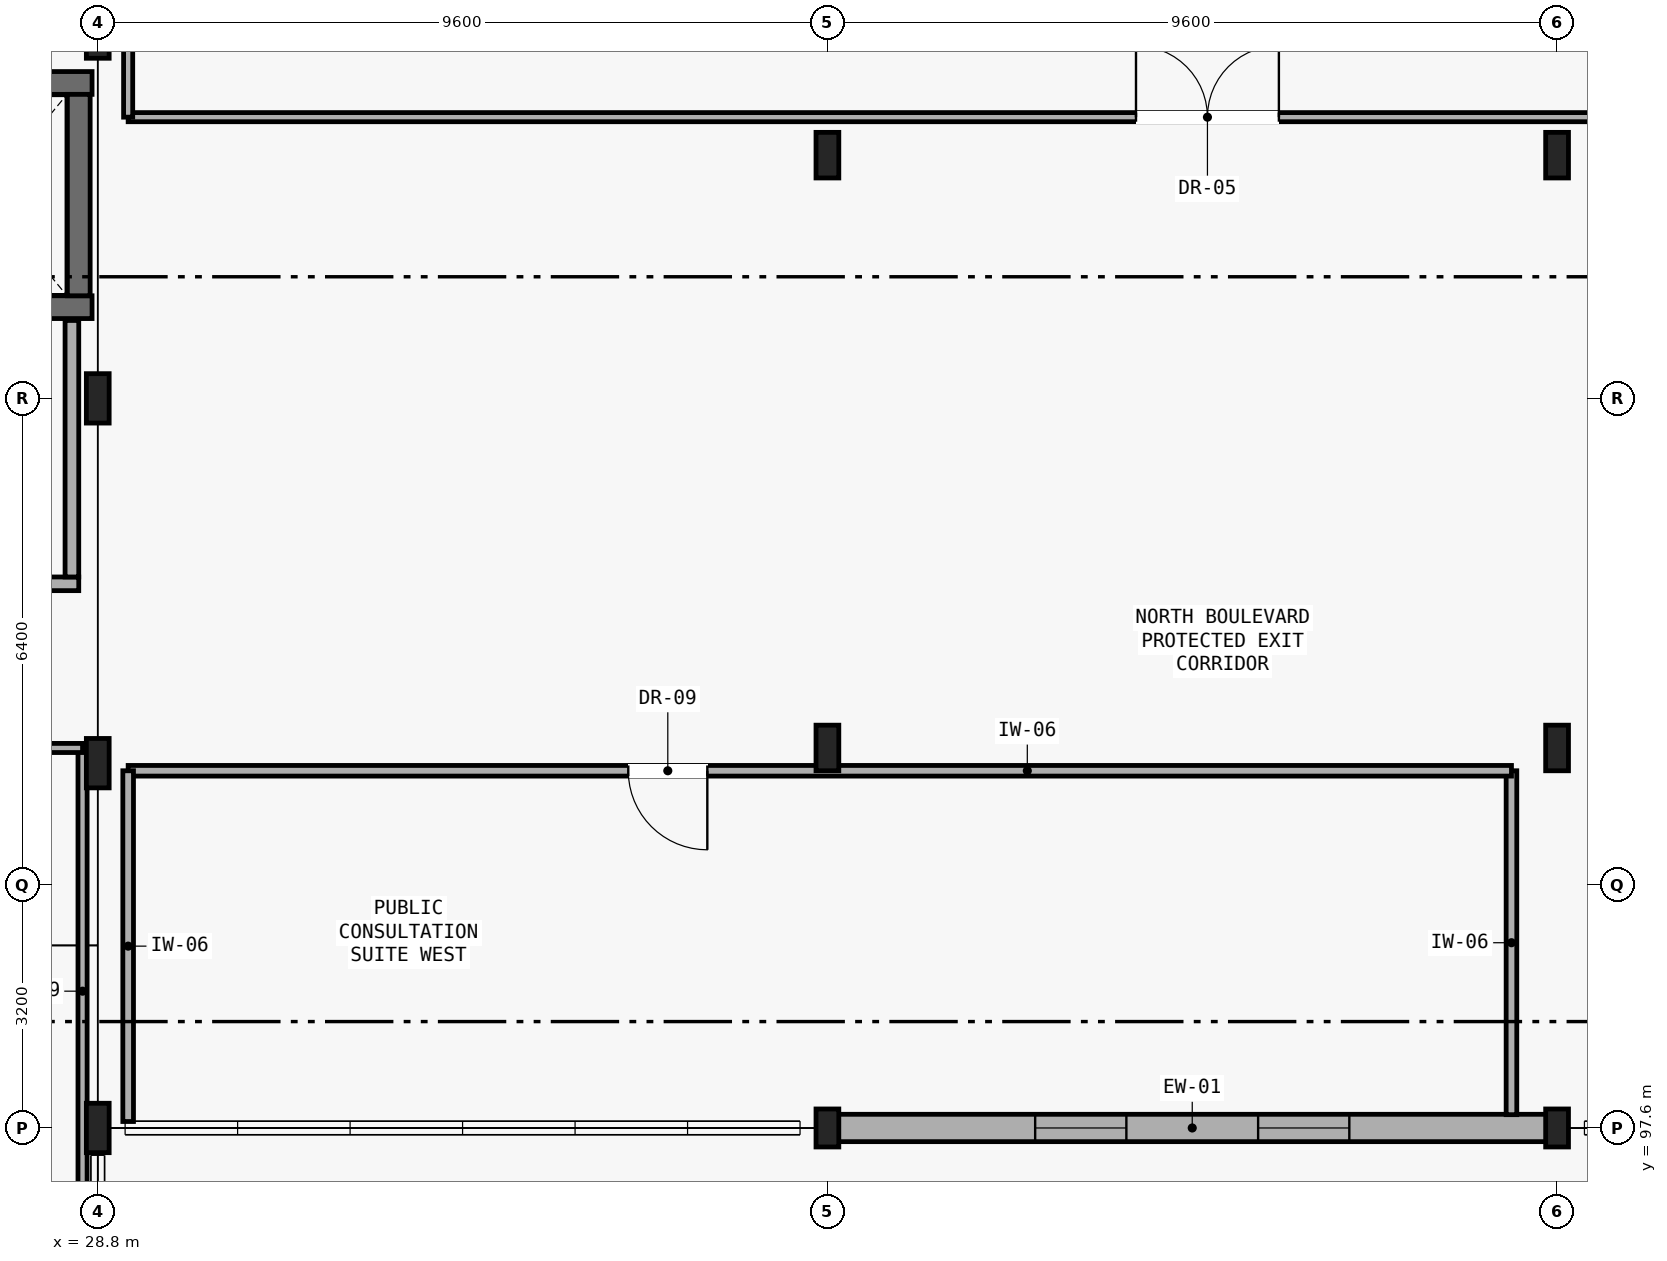
"""IFC4 building model, lengths in metres.
Left out: names, types, materials, properties, quantities, classifications, styles, units other than length and angle.
Written with IfcOpenShell. Run it as: python <this file> out.ifc"""

import sys

from ifc_helpers import new_model, si_unit, direction, frame, frame_2d, origin, origin_2d, place, context, subcontext, project, spatial, rectangle, i_section, extrude, element, fill, save


model = new_model("IFC4")
c1 = context("Model", 3, precision=1e-05, world=origin(), true_north=direction((0.0, 1.0)))
c2 = subcontext(c1, "Body", "Model", "MODEL_VIEW")
j1 = project(units=[si_unit("LENGTHUNIT", "METRE"), si_unit("PLANEANGLEUNIT", "RADIAN")], contexts=[c1])
p1 = place(None, origin())
s1 = spatial("IfcSite", under=j1, at=p1, CompositionType="ELEMENT")
p2 = place(p1, origin())
s2 = spatial("IfcBuilding", under=s1, at=p2, CompositionType="ELEMENT")
p3 = place(p2, origin())
s3 = spatial("IfcBuildingStorey", under=s2, at=p3, CompositionType="ELEMENT", Elevation=0.0)
for number, where, z_axis, x_axis in (
    (1, (28.8, 97.6, 0.0), (0.0, 0.0, 1.0), (1.0, 0.0, 0.0)),
    (2, (28.8, 102.4, 0.0), (0.0, 0.0, 1.0), (1.0, 0.0, 0.0)),
    (3, (28.8, 107.2, 0.0), (0.0, 0.0, 1.0), (1.0, 0.0, 0.0)),
    (4, (28.8, 112.0, 0.0), (0.0, 0.0, 1.0), (1.0, 0.0, 0.0)),
):
    element("IfcColumn", number, at=place(p3, frame(where, z_axis=z_axis, x_axis=x_axis)), inside=s3, PredefinedType="COLUMN", context=c2, shape_type="SweptSolid", body=[
        extrude(i_section(OverallWidth=0.3, OverallDepth=0.65, WebThickness=0.016, FlangeThickness=0.031, FilletRadius=0.027, at=origin_2d()), origin(), (0.0, 0.0, 1.0), 5.25),
    ])
p4 = place(p3, frame((38.4, 97.6, 0.0), z_axis=(0.0, 0.0, 1.0), x_axis=(1.0, 0.0, 0.0)))
e5 = element("IfcColumn", 5, at=p4, inside=s3, PredefinedType="COLUMN", context=c2, shape_type="SweptSolid", body=[
    extrude(i_section(OverallWidth=0.3, OverallDepth=0.5, WebThickness=0.014, FlangeThickness=0.028, FilletRadius=0.027, at=origin_2d()), origin(), (0.0, 0.0, 1.0), 5.25),
])
for number, where, z_axis, x_axis in (
    (6, (38.4, 102.6, 0.0), (0.0, 0.0, 1.0), (1.0, 0.0, 0.0)),
    (7, (38.4, 110.4, 0.0), (0.0, 0.0, 1.0), (1.0, 0.0, 0.0)),
):
    element("IfcColumn", number, at=place(p3, frame(where, z_axis=z_axis, x_axis=x_axis)), inside=s3, PredefinedType="COLUMN", context=c2, shape_type="SweptSolid", body=[
        extrude(i_section(OverallWidth=0.3, OverallDepth=0.6, WebThickness=0.015, FlangeThickness=0.03, FilletRadius=0.027, at=origin_2d()), origin(), (0.0, 0.0, 1.0), 5.25),
    ])
p5 = place(p3, frame((48.0, 97.6, 0.0), z_axis=(0.0, 0.0, 1.0), x_axis=(1.0, 0.0, 0.0)))
e8 = element("IfcColumn", 8, at=p5, inside=s3, PredefinedType="COLUMN", context=c2, shape_type="SweptSolid", body=[
    extrude(i_section(OverallWidth=0.3, OverallDepth=0.5, WebThickness=0.014, FlangeThickness=0.028, FilletRadius=0.027, at=origin_2d()), origin(), (0.0, 0.0, 1.0), 5.25),
])
for number, where, z_axis, x_axis in (
    (9, (48.0, 102.6, 0.0), (0.0, 0.0, 1.0), (1.0, 0.0, 0.0)),
    (10, (48.0, 110.4, 0.0), (0.0, 0.0, 1.0), (1.0, 0.0, 0.0)),
):
    element("IfcColumn", number, at=place(p3, frame(where, z_axis=z_axis, x_axis=x_axis)), inside=s3, PredefinedType="COLUMN", context=c2, shape_type="SweptSolid", body=[
        extrude(i_section(OverallWidth=0.3, OverallDepth=0.6, WebThickness=0.015, FlangeThickness=0.03, FilletRadius=0.027, at=origin_2d()), origin(), (0.0, 0.0, 1.0), 5.25),
    ])
p6 = place(p3, frame((38.409, 97.6, 0.0), z_axis=(0.0, 0.0, 1.0), x_axis=(1.0, 0.0, 0.0)))
e11 = element("IfcWall", 11, at=p6, inside=s3, PredefinedType="SOLIDWALL", context=c2, shape_type="SweptSolid", body=[
    extrude(rectangle(XDim=9.582, YDim=0.36, at=frame_2d((4.791, 0.0))), origin(), (0.0, 0.0, 1.0), 4.67),
])
p7 = place(p6, frame((2.724, 0.0, 0.9)))
e12 = element("IfcOpeningElement", 12, at=p7, cuts=e11, PredefinedType="OPENING", context=c2, shape_type="SweptSolid", body=[
    extrude(rectangle(XDim=1.2, YDim=1.45, at=frame_2d((0.6, 0.725))), frame((0.0, 0.19, 0.0), z_axis=(0.0, -1.0, 0.0), x_axis=(1.0, 0.0, 0.0)), (0.0, 0.0, 1.0), 0.38),
])
p8 = place(p6, frame((5.657, 0.0, 0.9)))
e13 = element("IfcOpeningElement", 13, at=p8, cuts=e11, PredefinedType="OPENING", context=c2, shape_type="SweptSolid", body=[
    extrude(rectangle(XDim=1.2, YDim=1.45, at=frame_2d((0.6, 0.725))), frame((0.0, 0.19, 0.0), z_axis=(0.0, -1.0, 0.0), x_axis=(1.0, 0.0, 0.0)), (0.0, 0.0, 1.0), 0.38),
])
p9 = place(p3, frame((26.225, 108.4, 0.0), z_axis=(0.0, 0.0, 1.0), x_axis=(1.0, 0.0, 0.0)))
e14 = element("IfcWall", 14, at=p9, inside=s3, PredefinedType="SHEAR", context=c2, shape_type="SweptSolid", body=[
    extrude(rectangle(XDim=2.5, YDim=0.3, at=frame_2d((1.25, 0.0))), origin(), (0.0, 0.0, 1.0), 5.0),
])
p10 = place(p9, frame((0.7, 0.0, 0.0)))
e15 = element("IfcOpeningElement", 15, at=p10, cuts=e14, PredefinedType="OPENING", context=c2, shape_type="SweptSolid", body=[
    extrude(rectangle(XDim=1.1, YDim=2.1, at=frame_2d((0.55, 1.05))), frame((0.0, 0.16, 0.0), z_axis=(0.0, -1.0, 0.0), x_axis=(1.0, 0.0, 0.0)), (0.0, 0.0, 1.0), 0.32),
])
p11 = place(p3, frame((26.225, 111.35, 0.0), z_axis=(0.0, 0.0, 1.0), x_axis=(1.0, 0.0, 0.0)))
e16 = element("IfcWall", 16, at=p11, inside=s3, PredefinedType="SHEAR", context=c2, shape_type="SweptSolid", body=[
    extrude(rectangle(XDim=2.5, YDim=0.3, at=frame_2d((1.25, 0.0))), origin(), (0.0, 0.0, 1.0), 5.0),
])
p12 = place(p3, frame((28.55, 108.55, 0.0), z_axis=(0.0, 0.0, 1.0), x_axis=(0.0, 1.0, 0.0)))
e17 = element("IfcWall", 17, at=p12, inside=s3, PredefinedType="SHEAR", context=c2, shape_type="SweptSolid", body=[
    extrude(rectangle(XDim=2.65, YDim=0.3, at=frame_2d((1.325, 0.0))), origin(), (0.0, 0.0, 1.0), 5.0),
])
p13 = place(p3, frame((20.0, 104.76, 0.0), z_axis=(0.0, 0.0, 1.0), x_axis=(1.0, 0.0, 0.0)))
e18 = element("IfcWall", 18, at=p13, inside=s3, PredefinedType="PARTITIONING", context=c2, shape_type="SweptSolid", body=[
    extrude(rectangle(XDim=8.55, YDim=0.18, at=frame_2d((4.275, 0.0))), origin(), (0.0, 0.0, 1.0), 4.48),
])
p14 = place(p3, frame((28.46, 104.85, 0.0), z_axis=(0.0, 0.0, 1.0), x_axis=(0.0, 1.0, 0.0)))
e19 = element("IfcWall", 19, at=p14, inside=s3, PredefinedType="PARTITIONING", context=c2, shape_type="SweptSolid", body=[
    extrude(rectangle(XDim=3.375, YDim=0.18, at=frame_2d((1.688, 0.0))), origin(), (0.0, 0.0, 1.0), 5.0),
])
p15 = place(p3, frame((28.6, 96.2, 0.0), z_axis=(0.0, 0.0, 1.0), x_axis=(0.0, 1.0, 0.0)))
e20 = element("IfcWall", 20, at=p15, inside=s3, PredefinedType="PARTITIONING", context=c2, shape_type="SweptSolid", body=[
    extrude(rectangle(XDim=6.4, YDim=0.12, at=frame_2d((3.2, 0.0))), origin(), (0.0, 0.0, 1.0), 4.44),
])
p16 = place(p3, frame((28.6, 102.6, 0.0), z_axis=(0.0, 0.0, 1.0), x_axis=(-1.0, 0.0, 0.0)))
e21 = element("IfcWall", 21, at=p16, inside=s3, PredefinedType="PARTITIONING", context=c2, shape_type="SweptSolid", body=[
    extrude(rectangle(XDim=8.52, YDim=0.12, at=frame_2d((4.26, 0.0))), origin(), (0.0, 0.0, 1.0), 4.08),
])
p17 = place(p16, frame((3.77, 0.0, 0.0)))
e22 = element("IfcOpeningElement", 22, at=p17, cuts=e21, PredefinedType="OPENING", context=c2, shape_type="SweptSolid", body=[
    extrude(rectangle(XDim=0.98, YDim=2.1, at=frame_2d((0.49, 1.05))), frame((0.0, 0.07, 0.0), z_axis=(0.0, -1.0, 0.0), x_axis=(1.0, 0.0, 0.0)), (0.0, 0.0, 1.0), 0.14),
])
p18 = place(p3, frame((29.2, 110.9, 0.0), z_axis=(0.0, 0.0, 1.0), x_axis=(1.0, 0.0, 0.0)))
e23 = element("IfcWall", 23, at=p18, inside=s3, PredefinedType="PARTITIONING", context=c2, shape_type="SweptSolid", body=[
    extrude(rectangle(XDim=28.4, YDim=0.12, at=frame_2d((14.2, 0.0))), origin(), (0.0, 0.0, 1.0), 5.0),
])
p19 = place(p18, frame((13.26, 0.0, 0.0)))
e24 = element("IfcOpeningElement", 24, at=p19, cuts=e23, PredefinedType="OPENING", context=c2, shape_type="SweptSolid", body=[
    extrude(rectangle(XDim=1.88, YDim=2.25, at=frame_2d((0.94, 1.125))), frame((0.0, 0.07, 0.0), z_axis=(0.0, -1.0, 0.0), x_axis=(1.0, 0.0, 0.0)), (0.0, 0.0, 1.0), 0.14),
])
p20 = place(p3, frame((29.2, 116.625, 0.0), z_axis=(0.0, 0.0, 1.0), x_axis=(0.0, -1.0, 0.0)))
e25 = element("IfcWall", 25, at=p20, inside=s3, PredefinedType="PARTITIONING", context=c2, shape_type="SweptSolid", body=[
    extrude(rectangle(XDim=5.725, YDim=0.12, at=frame_2d((2.863, 0.0))), origin(), (0.0, 0.0, 1.0), 5.0),
])
p21 = place(p3, frame((47.4, 97.775, 0.0), z_axis=(0.0, 0.0, 1.0), x_axis=(0.0, 1.0, 0.0)))
e26 = element("IfcWall", 26, at=p21, inside=s3, PredefinedType="PARTITIONING", context=c2, shape_type="SweptSolid", body=[
    extrude(rectangle(XDim=4.525, YDim=0.14, at=frame_2d((2.263, 0.0))), origin(), (0.0, 0.0, 1.0), 5.0),
])
p22 = place(p3, frame((47.4, 102.3, 0.0), z_axis=(0.0, 0.0, 1.0), x_axis=(-1.0, 0.0, 0.0)))
e27 = element("IfcWall", 27, at=p22, inside=s3, PredefinedType="PARTITIONING", context=c2, shape_type="SweptSolid", body=[
    extrude(rectangle(XDim=18.2, YDim=0.14, at=frame_2d((9.1, 0.0))), origin(), (0.0, 0.0, 1.0), 4.44),
])
p23 = place(p22, frame((10.58, 0.0, 0.0)))
e28 = element("IfcOpeningElement", 28, at=p23, cuts=e27, PredefinedType="OPENING", context=c2, shape_type="SweptSolid", body=[
    extrude(rectangle(XDim=1.04, YDim=2.08, at=frame_2d((0.52, 1.04))), frame((0.0, 0.08, 0.0), z_axis=(0.0, -1.0, 0.0), x_axis=(1.0, 0.0, 0.0)), (0.0, 0.0, 1.0), 0.16),
])
p24 = place(p3, frame((29.2, 102.3, 0.0), z_axis=(0.0, 0.0, 1.0), x_axis=(0.0, -1.0, 0.0)))
e29 = element("IfcWall", 29, at=p24, inside=s3, PredefinedType="PARTITIONING", context=c2, shape_type="SweptSolid", body=[
    extrude(rectangle(XDim=4.615, YDim=0.14, at=frame_2d((2.308, 0.0))), origin(), (0.0, 0.0, 1.0), 5.0),
])
p25 = place(p7, origin())
e30 = element("IfcWindow", 30, at=p25, inside=s3, PartitioningType="SINGLE_PANEL", PredefinedType="WINDOW", context=c2, shape_type="SweptSolid", body=[
    extrude(rectangle(XDim=1.2, YDim=1.45, at=frame_2d((0.6, 0.725))), frame((0.0, 0.03, 0.0), z_axis=(0.0, -1.0, 0.0), x_axis=(1.0, 0.0, 0.0)), (0.0, 0.0, 1.0), 0.06),
])
fill(e12, e30)
p26 = place(p8, origin())
e31 = element("IfcWindow", 31, at=p26, inside=s3, PartitioningType="SINGLE_PANEL", PredefinedType="WINDOW", context=c2, shape_type="SweptSolid", body=[
    extrude(rectangle(XDim=1.2, YDim=1.45, at=frame_2d((0.6, 0.725))), frame((0.0, 0.03, 0.0), z_axis=(0.0, -1.0, 0.0), x_axis=(1.0, 0.0, 0.0)), (0.0, 0.0, 1.0), 0.06),
])
fill(e13, e31)
p27 = place(p19, origin())
e32 = element("IfcDoor", 32, at=p27, inside=s3, OperationType="DOUBLE_DOOR_SINGLE_SWING", PredefinedType="DOOR", context=c2, shape_type="SweptSolid", body=[
    extrude(rectangle(XDim=1.88, YDim=2.25, at=frame_2d((0.94, 1.125))), frame((0.0, 0.025, 0.0), z_axis=(0.0, -1.0, 0.0), x_axis=(1.0, 0.0, 0.0)), (0.0, 0.0, 1.0), 0.05),
])
fill(e24, e32)
p28 = place(p23, origin())
e33 = element("IfcDoor", 33, at=p28, inside=s3, OperationType="SINGLE_SWING_LEFT", PredefinedType="DOOR", context=c2, shape_type="SweptSolid", body=[
    extrude(rectangle(XDim=1.04, YDim=2.08, at=frame_2d((0.52, 1.04))), frame((0.0, 0.025, 0.0), z_axis=(0.0, -1.0, 0.0), x_axis=(1.0, 0.0, 0.0)), (0.0, 0.0, 1.0), 0.05),
])
fill(e28, e33)
save(model, sys.argv[1])
